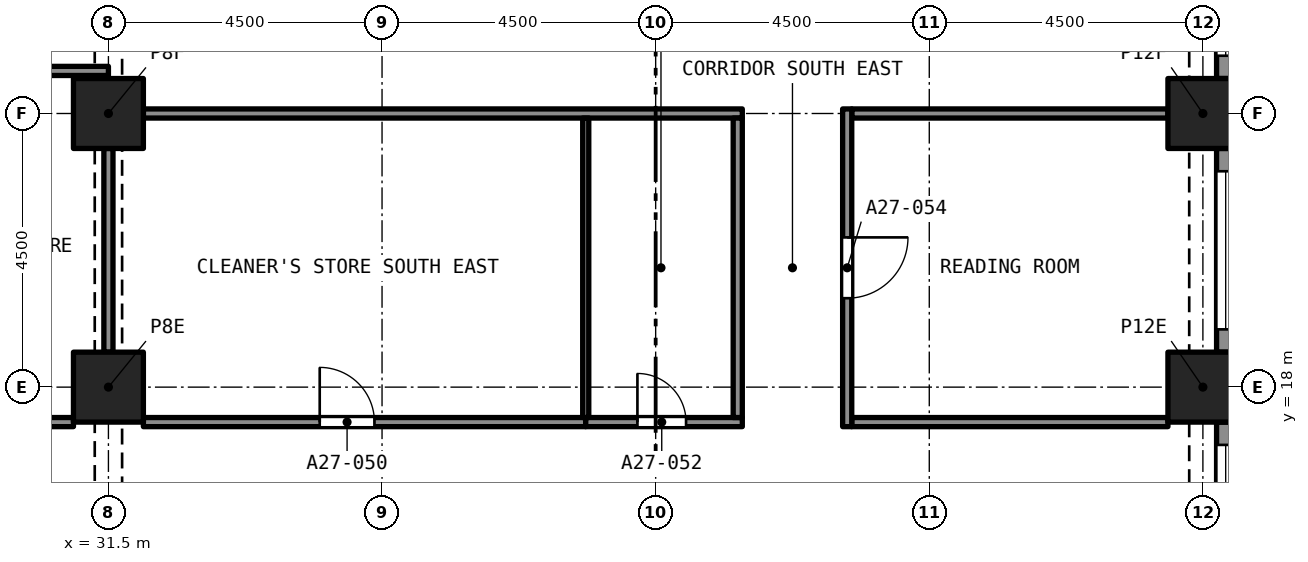
"""IFC4 building model, lengths in metres.
Left out: names, types, materials, properties, quantities, classifications, styles, units other than length and angle.
Written with IfcOpenShell. Run it as: python <this file> out.ifc"""

import sys

from ifc_helpers import new_model, si_unit, direction, frame, frame_2d, origin, origin_2d, place, context, subcontext, project, spatial, rectangle, extrude, element, fill, save


model = new_model("IFC4")
c1 = context("Model", 3, precision=1e-05, world=origin(), true_north=direction((0.0, 1.0)))
c2 = subcontext(c1, "Body", "Model", "MODEL_VIEW")
j1 = project(units=[si_unit("LENGTHUNIT", "METRE"), si_unit("PLANEANGLEUNIT", "RADIAN")], contexts=[c1])
p1 = place(None, origin())
s1 = spatial("IfcSite", under=j1, at=p1, CompositionType="ELEMENT")
p2 = place(p1, origin())
s2 = spatial("IfcBuilding", under=s1, at=p2, CompositionType="ELEMENT")
p3 = place(p2, frame((0.0, 0.0, 99.2)))
s3 = spatial("IfcBuildingStorey", under=s2, at=p3, CompositionType="ELEMENT", Elevation=99.2)
for number, where, z_axis, x_axis in (
    (1, (31.5, 18.0, 0.0), (0.0, 0.0, 1.0), (1.0, 0.0, 0.0)),
    (2, (49.5, 18.0, 0.0), (0.0, 0.0, 1.0), (1.0, 0.0, 0.0)),
    (3, (31.5, 22.5, 0.0), (0.0, 0.0, 1.0), (1.0, 0.0, 0.0)),
    (4, (49.5, 22.5, 0.0), (0.0, 0.0, 1.0), (1.0, 0.0, 0.0)),
):
    element("IfcColumn", number, at=place(p3, frame(where, z_axis=z_axis, x_axis=x_axis)), inside=s3, PredefinedType="COLUMN", context=c2, shape_type="SweptSolid", body=[
        extrude(rectangle(XDim=1.15, YDim=1.15, at=origin_2d()), origin(), (0.0, 0.0, 1.0), 3.2),
    ])
p4 = place(p3, frame((49.875, 17.425, 0.0), z_axis=(0.0, 0.0, 1.0), x_axis=(0.0, -1.0, 0.0)))
e5 = element("IfcWall", 5, at=p4, inside=s3, PredefinedType="SOLIDWALL", context=c2, shape_type="SweptSolid", body=[
    extrude(rectangle(XDim=3.35, YDim=0.3, at=frame_2d((1.675, 0.0))), origin(), (0.0, 0.0, 1.0), 3.2),
])
p5 = place(p4, frame((0.375, 0.0, 0.45)))
e6 = element("IfcOpeningElement", 6, at=p5, cuts=e5, PredefinedType="OPENING", context=c2, shape_type="SweptSolid", body=[
    extrude(rectangle(XDim=2.6, YDim=1.95, at=frame_2d((1.3, 0.975))), frame((0.0, 0.16, 0.0), z_axis=(0.0, -1.0, 0.0), x_axis=(1.0, 0.0, 0.0)), (0.0, 0.0, 1.0), 0.32),
])
p6 = place(p3, frame((49.875, 21.925, 0.0), z_axis=(0.0, 0.0, 1.0), x_axis=(0.0, -1.0, 0.0)))
e7 = element("IfcWall", 7, at=p6, inside=s3, PredefinedType="SOLIDWALL", context=c2, shape_type="SweptSolid", body=[
    extrude(rectangle(XDim=3.35, YDim=0.3, at=frame_2d((1.675, 0.0))), origin(), (0.0, 0.0, 1.0), 3.2),
])
p7 = place(p6, frame((0.375, 0.0, 0.45)))
e8 = element("IfcOpeningElement", 8, at=p7, cuts=e7, PredefinedType="OPENING", context=c2, shape_type="SweptSolid", body=[
    extrude(rectangle(XDim=2.6, YDim=1.95, at=frame_2d((1.3, 0.975))), frame((0.0, 0.16, 0.0), z_axis=(0.0, -1.0, 0.0), x_axis=(1.0, 0.0, 0.0)), (0.0, 0.0, 1.0), 0.32),
])
p8 = place(p3, frame((49.875, 26.425, 0.0), z_axis=(0.0, 0.0, 1.0), x_axis=(0.0, -1.0, 0.0)))
e9 = element("IfcWall", 9, at=p8, inside=s3, PredefinedType="SOLIDWALL", context=c2, shape_type="SweptSolid", body=[
    extrude(rectangle(XDim=3.35, YDim=0.3, at=frame_2d((1.675, 0.0))), origin(), (0.0, 0.0, 1.0), 3.2),
])
p9 = place(p8, frame((0.375, 0.0, 0.45)))
e10 = element("IfcOpeningElement", 10, at=p9, cuts=e9, PredefinedType="OPENING", context=c2, shape_type="SweptSolid", body=[
    extrude(rectangle(XDim=2.6, YDim=1.95, at=frame_2d((1.3, 0.975))), frame((0.0, 0.16, 0.0), z_axis=(0.0, -1.0, 0.0), x_axis=(1.0, 0.0, 0.0)), (0.0, 0.0, 1.0), 0.32),
])
p10 = place(p3, frame((25.725, 17.425, 0.0), z_axis=(0.0, 0.0, 1.0), x_axis=(1.0, 0.0, 0.0)))
e11 = element("IfcWall", 11, at=p10, inside=s3, PredefinedType="PARTITIONING", context=c2, shape_type="SweptSolid", body=[
    extrude(rectangle(XDim=5.2, YDim=0.15, at=frame_2d((2.6, 0.0))), origin(), (0.0, 0.0, 1.0), 2.75),
])
p11 = place(p3, frame((32.075, 17.425, 0.0), z_axis=(0.0, 0.0, 1.0), x_axis=(1.0, 0.0, 0.0)))
e12 = element("IfcWall", 12, at=p11, inside=s3, PredefinedType="PARTITIONING", context=c2, shape_type="SweptSolid", body=[
    extrude(rectangle(XDim=7.275, YDim=0.15, at=frame_2d((3.638, 0.0))), origin(), (0.0, 0.0, 1.0), 2.9),
])
p12 = place(p11, frame((2.9, 0.0, 0.0)))
e13 = element("IfcOpeningElement", 13, at=p12, cuts=e12, PredefinedType="OPENING", context=c2, shape_type="SweptSolid", body=[
    extrude(rectangle(XDim=0.9, YDim=2.1, at=frame_2d((0.45, 1.05))), frame((0.0, 0.085, 0.0), z_axis=(0.0, -1.0, 0.0), x_axis=(1.0, 0.0, 0.0)), (0.0, 0.0, 1.0), 0.17),
])
p13 = place(p3, frame((39.35, 17.425, 0.0), z_axis=(0.0, 0.0, 1.0), x_axis=(1.0, 0.0, 0.0)))
e14 = element("IfcWall", 14, at=p13, inside=s3, PredefinedType="PARTITIONING", context=c2, shape_type="SweptSolid", body=[
    extrude(rectangle(XDim=2.575, YDim=0.15, at=frame_2d((1.288, 0.0))), origin(), (0.0, 0.0, 1.0), 2.9),
])
p14 = place(p13, frame((0.85, 0.0, 0.0)))
e15 = element("IfcOpeningElement", 15, at=p14, cuts=e14, PredefinedType="OPENING", context=c2, shape_type="SweptSolid", body=[
    extrude(rectangle(XDim=0.8, YDim=2.1, at=frame_2d((0.4, 1.05))), frame((0.0, 0.085, 0.0), z_axis=(0.0, -1.0, 0.0), x_axis=(1.0, 0.0, 0.0)), (0.0, 0.0, 1.0), 0.17),
])
p15 = place(p3, frame((43.725, 17.425, 0.0), z_axis=(0.0, 0.0, 1.0), x_axis=(1.0, 0.0, 0.0)))
e16 = element("IfcWall", 16, at=p15, inside=s3, PredefinedType="PARTITIONING", context=c2, shape_type="SweptSolid", body=[
    extrude(rectangle(XDim=5.2, YDim=0.15, at=frame_2d((2.6, 0.0))), origin(), (0.0, 0.0, 1.0), 2.9),
])
p16 = place(p3, frame((25.725, 23.2, 0.0), z_axis=(0.0, 0.0, 1.0), x_axis=(1.0, 0.0, 0.0)))
e17 = element("IfcWall", 17, at=p16, inside=s3, PredefinedType="PARTITIONING", context=c2, shape_type="SweptSolid", body=[
    extrude(rectangle(XDim=5.775, YDim=0.15, at=frame_2d((2.887, 0.0))), origin(), (0.0, 0.0, 1.0), 2.75),
])
p17 = place(p3, frame((31.5, 18.575, 0.0), z_axis=(0.0, 0.0, 1.0), x_axis=(0.0, 1.0, 0.0)))
e18 = element("IfcWall", 18, at=p17, inside=s3, PredefinedType="PARTITIONING", context=c2, shape_type="SweptSolid", body=[
    extrude(rectangle(XDim=3.35, YDim=0.15, at=frame_2d((1.675, 0.0))), origin(), (0.0, 0.0, 1.0), 2.38),
])
p18 = place(p3, frame((32.075, 22.5, 0.0), z_axis=(0.0, 0.0, 1.0), x_axis=(1.0, 0.0, 0.0)))
e19 = element("IfcWall", 19, at=p18, inside=s3, PredefinedType="PARTITIONING", context=c2, shape_type="SweptSolid", body=[
    extrude(rectangle(XDim=9.85, YDim=0.15, at=frame_2d((4.925, 0.0))), origin(), (0.0, 0.0, 1.0), 2.9),
])
p19 = place(p3, frame((43.725, 22.5, 0.0), z_axis=(0.0, 0.0, 1.0), x_axis=(1.0, 0.0, 0.0)))
e20 = element("IfcWall", 20, at=p19, inside=s3, PredefinedType="PARTITIONING", context=c2, shape_type="SweptSolid", body=[
    extrude(rectangle(XDim=5.2, YDim=0.15, at=frame_2d((2.6, 0.0))), origin(), (0.0, 0.0, 1.0), 2.9),
])
p20 = place(p3, frame((41.85, 17.5, 0.0), z_axis=(0.0, 0.0, 1.0), x_axis=(0.0, 1.0, 0.0)))
e21 = element("IfcWall", 21, at=p20, inside=s3, PredefinedType="PARTITIONING", context=c2, shape_type="SweptSolid", body=[
    extrude(rectangle(XDim=4.925, YDim=0.15, at=frame_2d((2.462, 0.0))), origin(), (0.0, 0.0, 1.0), 2.9),
])
p21 = place(p3, frame((43.65, 22.575, 0.0), z_axis=(0.0, 0.0, 1.0), x_axis=(0.0, -1.0, 0.0)))
e22 = element("IfcWall", 22, at=p21, inside=s3, PredefinedType="PARTITIONING", context=c2, shape_type="SweptSolid", body=[
    extrude(rectangle(XDim=5.225, YDim=0.15, at=frame_2d((2.612, 0.0))), origin(), (0.0, 0.0, 1.0), 2.9),
])
p22 = place(p21, frame((2.113, 0.0, 0.0)))
e23 = element("IfcOpeningElement", 23, at=p22, cuts=e22, PredefinedType="OPENING", context=c2, shape_type="SweptSolid", body=[
    extrude(rectangle(XDim=1.0, YDim=2.1, at=frame_2d((0.5, 1.05))), frame((0.0, 0.085, 0.0), z_axis=(0.0, -1.0, 0.0), x_axis=(1.0, 0.0, 0.0)), (0.0, 0.0, 1.0), 0.17),
])
p23 = place(p3, frame((39.35, 17.5, 0.0), z_axis=(0.0, 0.0, 1.0), x_axis=(0.0, 1.0, 0.0)))
e24 = element("IfcWall", 24, at=p23, inside=s3, PredefinedType="PARTITIONING", context=c2, shape_type="SweptSolid", body=[
    extrude(rectangle(XDim=4.925, YDim=0.1, at=frame_2d((2.462, 0.0))), origin(), (0.0, 0.0, 1.0), 2.9),
])
p24 = place(p5, origin())
e25 = element("IfcWindow", 25, at=p24, inside=s3, PartitioningType="SINGLE_PANEL", PredefinedType="WINDOW", context=c2, shape_type="SweptSolid", body=[
    extrude(rectangle(XDim=2.6, YDim=1.95, at=frame_2d((1.3, 0.975))), frame((0.0, 0.03, 0.0), z_axis=(0.0, -1.0, 0.0), x_axis=(1.0, 0.0, 0.0)), (0.0, 0.0, 1.0), 0.06),
])
fill(e6, e25)
p25 = place(p7, origin())
e26 = element("IfcWindow", 26, at=p25, inside=s3, PartitioningType="SINGLE_PANEL", PredefinedType="WINDOW", context=c2, shape_type="SweptSolid", body=[
    extrude(rectangle(XDim=2.6, YDim=1.95, at=frame_2d((1.3, 0.975))), frame((0.0, 0.03, 0.0), z_axis=(0.0, -1.0, 0.0), x_axis=(1.0, 0.0, 0.0)), (0.0, 0.0, 1.0), 0.06),
])
fill(e8, e26)
p26 = place(p9, origin())
e27 = element("IfcWindow", 27, at=p26, inside=s3, PartitioningType="SINGLE_PANEL", PredefinedType="WINDOW", context=c2, shape_type="SweptSolid", body=[
    extrude(rectangle(XDim=2.6, YDim=1.95, at=frame_2d((1.3, 0.975))), frame((0.0, 0.03, 0.0), z_axis=(0.0, -1.0, 0.0), x_axis=(1.0, 0.0, 0.0)), (0.0, 0.0, 1.0), 0.06),
])
fill(e10, e27)
p27 = place(p12, origin())
e28 = element("IfcDoor", 28, at=p27, inside=s3, OperationType="SINGLE_SWING_LEFT", PredefinedType="DOOR", context=c2, shape_type="SweptSolid", body=[
    extrude(rectangle(XDim=0.9, YDim=2.1, at=frame_2d((0.45, 1.05))), frame((0.0, 0.025, 0.0), z_axis=(0.0, -1.0, 0.0), x_axis=(1.0, 0.0, 0.0)), (0.0, 0.0, 1.0), 0.05),
])
fill(e13, e28)
p28 = place(p14, origin())
e29 = element("IfcDoor", 29, at=p28, inside=s3, OperationType="SINGLE_SWING_LEFT", PredefinedType="DOOR", context=c2, shape_type="SweptSolid", body=[
    extrude(rectangle(XDim=0.8, YDim=2.1, at=frame_2d((0.4, 1.05))), frame((0.0, 0.025, 0.0), z_axis=(0.0, -1.0, 0.0), x_axis=(1.0, 0.0, 0.0)), (0.0, 0.0, 1.0), 0.05),
])
fill(e15, e29)
p29 = place(p22, origin())
e30 = element("IfcDoor", 30, at=p29, inside=s3, OperationType="SINGLE_SWING_RIGHT", PredefinedType="DOOR", context=c2, shape_type="SweptSolid", body=[
    extrude(rectangle(XDim=1.0, YDim=2.1, at=frame_2d((0.5, 1.05))), frame((0.0, 0.025, 0.0), z_axis=(0.0, -1.0, 0.0), x_axis=(1.0, 0.0, 0.0)), (0.0, 0.0, 1.0), 0.05),
])
fill(e23, e30)
save(model, sys.argv[1])
